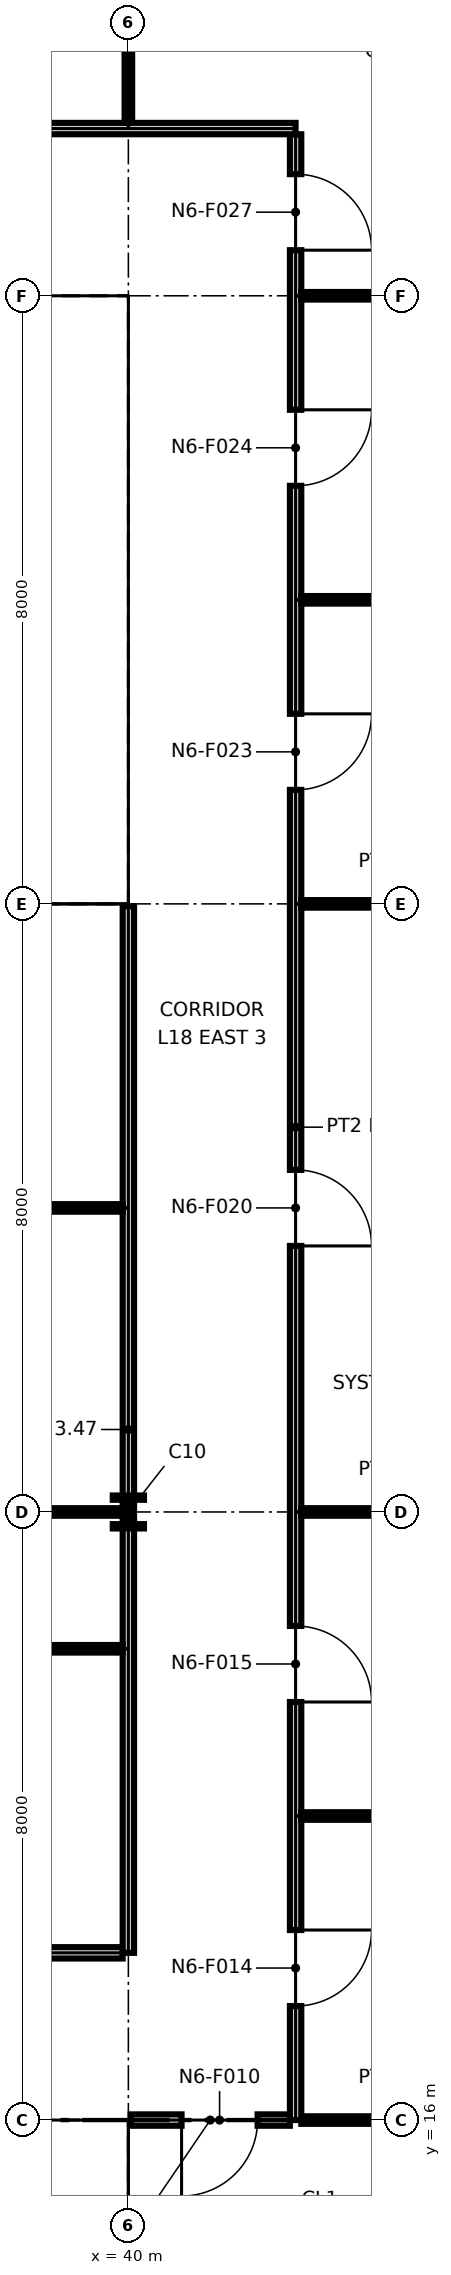
"""IFC4 building model, lengths in metres.
Left out: names, types, materials, properties, quantities, classifications, styles, units other than length and angle.
Written with IfcOpenShell. Run it as: python <this file> out.ifc"""

import sys

from ifc_helpers import new_model, si_unit, direction, frame, frame_2d, origin, origin_2d, place, context, subcontext, project, spatial, polyline, rectangle, i_section, outline, extrude, element, fill, save


model = new_model("IFC4")
c1 = context("Model", 3, precision=1e-05, world=origin(), true_north=direction((0.0, 1.0)))
c2 = subcontext(c1, "Body", "Model", "MODEL_VIEW")
j1 = project(units=[si_unit("LENGTHUNIT", "METRE"), si_unit("PLANEANGLEUNIT", "RADIAN")], contexts=[c1])
p1 = place(None, origin())
s1 = spatial("IfcSite", under=j1, at=p1, CompositionType="ELEMENT")
p2 = place(p1, origin())
s2 = spatial("IfcBuilding", under=s1, at=p2, CompositionType="ELEMENT")
p3 = place(p2, frame((0.0, 0.0, 96.4)))
s3 = spatial("IfcBuildingStorey", under=s2, at=p3, CompositionType="ELEMENT", Elevation=96.4)
p4 = place(p3, frame((40.0, 16.0, 0.0), z_axis=(0.0, 0.0, 1.0), x_axis=(1.0, 0.0, 0.0)))
e1 = element("IfcColumn", 1, at=p4, inside=s3, PredefinedType="COLUMN", context=c2, shape_type="SweptSolid", body=[
    extrude(i_section(OverallWidth=0.406, OverallDepth=0.417, WebThickness=0.03, FlangeThickness=0.048, at=origin_2d()), origin(), (0.0, 0.0, 1.0), 4.25),
])
p5 = place(p3, frame((40.0, 24.0, 0.0), z_axis=(0.0, 0.0, 1.0), x_axis=(1.0, 0.0, 0.0)))
e2 = element("IfcColumn", 2, at=p5, inside=s3, PredefinedType="COLUMN", context=c2, shape_type="SweptSolid", body=[
    extrude(i_section(OverallWidth=0.411, OverallDepth=0.434, WebThickness=0.036, FlangeThickness=0.057, at=origin_2d()), origin(), (0.0, 0.0, 1.0), 4.25),
])
for number, where, z_axis, x_axis in (
    (3, (40.0, 32.0, 0.0), (0.0, 0.0, 1.0), (1.0, 0.0, 0.0)),
    (4, (40.0, 40.0, 0.0), (0.0, 0.0, 1.0), (1.0, 0.0, 0.0)),
):
    element("IfcColumn", number, at=place(p3, frame(where, z_axis=z_axis, x_axis=x_axis)), inside=s3, PredefinedType="COLUMN", context=c2, shape_type="SweptSolid", body=[
        extrude(i_section(OverallWidth=0.257, OverallDepth=0.363, WebThickness=0.013, FlangeThickness=0.022, at=origin_2d()), origin(), (0.0, 0.0, 1.0), 4.25),
    ])
p6 = place(p3, frame((24.65, 15.25, 0.0), z_axis=(0.0, 0.0, 1.0), x_axis=(1.0, 0.0, 0.0)))
e5 = element("IfcWall", 5, at=p6, inside=s3, PredefinedType="PARTITIONING", context=c2, shape_type="SweptSolid", body=[
    extrude(outline(polyline([(0.0, 0.0), (14.7, 0.0), (14.7, 4.25), (7.469, 4.25), (7.469, 3.632), (7.231, 3.632), (7.23, 4.25), (0.0, 4.25), (0.0, 0.0)])), frame((0.0, 0.1, 0.0), z_axis=(0.0, -1.0, 0.0), x_axis=(1.0, 0.0, 0.0)), (0.0, 0.0, 1.0), 0.2),
])
p7 = place(p6, frame((2.85, 0.0, 0.0)))
e6 = element("IfcOpeningElement", 6, at=p7, cuts=e5, PredefinedType="OPENING", context=c2, shape_type="SweptSolid", body=[
    extrude(rectangle(XDim=1.8, YDim=2.1, at=frame_2d((0.9, 1.05))), frame((0.0, 0.11, 0.0), z_axis=(0.0, -1.0, 0.0), x_axis=(1.0, 0.0, 0.0)), (0.0, 0.0, 1.0), 0.22),
])
p8 = place(p6, frame((9.95, 0.0, 0.0), z_axis=(0.0, 0.0, 1.0), x_axis=(-1.0, 0.0, 0.0)))
e7 = element("IfcOpeningElement", 7, at=p8, cuts=e5, PredefinedType="OPENING", context=c2, shape_type="SweptSolid", body=[
    extrude(rectangle(XDim=1.4, YDim=2.1, at=frame_2d((0.7, 1.05))), frame((0.0, 0.11, 0.0), z_axis=(0.0, -1.0, 0.0), x_axis=(1.0, 0.0, 0.0)), (0.0, 0.0, 1.0), 0.22),
])
p9 = place(p6, frame((13.4, 0.0, 0.0), z_axis=(0.0, 0.0, 1.0), x_axis=(-1.0, 0.0, 0.0)))
e8 = element("IfcOpeningElement", 8, at=p9, cuts=e5, PredefinedType="OPENING", context=c2, shape_type="SweptSolid", body=[
    extrude(rectangle(XDim=1.4, YDim=2.1, at=frame_2d((0.7, 1.05))), frame((0.0, 0.11, 0.0), z_axis=(0.0, -1.0, 0.0), x_axis=(1.0, 0.0, 0.0)), (0.0, 0.0, 1.0), 0.22),
])
p10 = place(p3, frame((39.25, 8.85, 0.0), z_axis=(0.0, 0.0, 1.0), x_axis=(0.0, 1.0, 0.0)))
e9 = element("IfcWall", 9, at=p10, inside=s3, PredefinedType="PARTITIONING", context=c2, shape_type="SweptSolid", body=[
    extrude(rectangle(XDim=6.3, YDim=0.2, at=frame_2d((3.15, 0.0))), origin(), (0.0, 0.0, 1.0), 4.25),
])
p11 = place(p3, frame((24.65, 32.75, 0.0), z_axis=(0.0, 0.0, 1.0), x_axis=(1.0, 0.0, 0.0)))
e10 = element("IfcWall", 10, at=p11, inside=s3, PredefinedType="PARTITIONING", context=c2, shape_type="SweptSolid", body=[
    extrude(outline(polyline([(0.0, 0.0), (14.7, 0.0), (14.7, 4.25), (7.469, 4.25), (7.469, 3.632), (7.231, 3.632), (7.23, 4.25), (0.0, 4.25), (0.0, 0.0)])), frame((0.0, 0.1, 0.0), z_axis=(0.0, -1.0, 0.0), x_axis=(1.0, 0.0, 0.0)), (0.0, 0.0, 1.0), 0.2),
])
p12 = place(p11, frame((4.1, 0.0, 0.0)))
e11 = element("IfcOpeningElement", 11, at=p12, cuts=e10, PredefinedType="OPENING", context=c2, shape_type="SweptSolid", body=[
    extrude(rectangle(XDim=1.8, YDim=2.1, at=frame_2d((0.9, 1.05))), frame((0.0, 0.11, 0.0), z_axis=(0.0, -1.0, 0.0), x_axis=(1.0, 0.0, 0.0)), (0.0, 0.0, 1.0), 0.22),
])
p13 = place(p11, frame((8.55, 0.0, 0.0)))
e12 = element("IfcOpeningElement", 12, at=p13, cuts=e10, PredefinedType="OPENING", context=c2, shape_type="SweptSolid", body=[
    extrude(rectangle(XDim=1.4, YDim=2.1, at=frame_2d((0.7, 1.05))), frame((0.0, 0.11, 0.0), z_axis=(0.0, -1.0, 0.0), x_axis=(1.0, 0.0, 0.0)), (0.0, 0.0, 1.0), 0.22),
])
p14 = place(p11, frame((12.0, 0.0, 0.0)))
e13 = element("IfcOpeningElement", 13, at=p14, cuts=e10, PredefinedType="OPENING", context=c2, shape_type="SweptSolid", body=[
    extrude(rectangle(XDim=1.4, YDim=2.1, at=frame_2d((0.7, 1.05))), frame((0.0, 0.11, 0.0), z_axis=(0.0, -1.0, 0.0), x_axis=(1.0, 0.0, 0.0)), (0.0, 0.0, 1.0), 0.22),
])
p15 = place(p3, frame((24.65, 39.25, 0.0), z_axis=(0.0, 0.0, 1.0), x_axis=(1.0, 0.0, 0.0)))
e14 = element("IfcWall", 14, at=p15, inside=s3, PredefinedType="PARTITIONING", context=c2, shape_type="SweptSolid", body=[
    extrude(outline(polyline([(0.0, 0.0), (14.7, 0.0), (14.7, 4.25), (7.469, 4.25), (7.469, 3.632), (7.231, 3.632), (7.23, 4.25), (0.0, 4.25), (0.0, 0.0)])), frame((0.0, 0.1, 0.0), z_axis=(0.0, -1.0, 0.0), x_axis=(1.0, 0.0, 0.0)), (0.0, 0.0, 1.0), 0.2),
])
p16 = place(p3, frame((39.25, 32.85, 0.0), z_axis=(0.0, 0.0, 1.0), x_axis=(0.0, 1.0, 0.0)))
e15 = element("IfcWall", 15, at=p16, inside=s3, PredefinedType="PARTITIONING", context=c2, shape_type="SweptSolid", body=[
    extrude(rectangle(XDim=6.3, YDim=0.2, at=frame_2d((3.15, 0.0))), origin(), (0.0, 0.0, 1.0), 4.25),
])
p17 = place(p3, frame((40.03, 16.0, 0.0), z_axis=(0.0, 0.0, 1.0), x_axis=(1.0, 0.0, 0.0)))
e16 = element("IfcWall", 16, at=p17, inside=s3, PredefinedType="PARTITIONING", context=c2, shape_type="SweptSolid", body=[
    extrude(rectangle(XDim=2.095, YDim=0.15, at=frame_2d((1.047, 0.0))), origin(), (0.0, 0.0, 1.0), 3.47),
])
p18 = place(p17, frame((1.67, 0.0, 0.0), z_axis=(0.0, 0.0, 1.0), x_axis=(-1.0, 0.0, 0.0)))
e17 = element("IfcOpeningElement", 17, at=p18, cuts=e16, PredefinedType="OPENING", context=c2, shape_type="SweptSolid", body=[
    extrude(rectangle(XDim=1.0, YDim=2.1, at=frame_2d((0.5, 1.05))), frame((0.0, 0.085, 0.0), z_axis=(0.0, -1.0, 0.0), x_axis=(1.0, 0.0, 0.0)), (0.0, 0.0, 1.0), 0.17),
])
p19 = place(p3, frame((42.275, 16.0, 0.0), z_axis=(0.0, 0.0, 1.0), x_axis=(1.0, 0.0, 0.0)))
e18 = element("IfcWall", 18, at=p19, inside=s3, PredefinedType="PARTITIONING", context=c2, shape_type="SweptSolid", body=[
    extrude(rectangle(XDim=2.895, YDim=0.1, at=frame_2d((1.448, 0.0))), origin(), (0.0, 0.0, 1.0), 3.47),
])
p20 = place(p3, frame((42.2, 16.0, 0.0), z_axis=(0.0, 0.0, 1.0), x_axis=(0.0, 1.0, 0.0)))
e19 = element("IfcWall", 19, at=p20, inside=s3, PredefinedType="PARTITIONING", context=c2, shape_type="SweptSolid", body=[
    extrude(outline(polyline([(0.0, 0.0), (26.125, 0.0), (26.125, 4.25), (24.3, 4.25), (24.298, 3.47), (23.702, 3.47), (23.7, 4.25), (20.3, 4.25), (20.298, 3.47), (19.702, 3.47), (19.7, 4.25), (16.3, 4.25), (16.298, 3.47), (15.702, 3.47), (15.7, 4.25), (12.3, 4.25), (12.298, 3.47), (11.702, 3.47), (11.7, 4.25), (8.3, 4.25), (8.298, 3.47), (7.702, 3.47), (7.7, 4.25), (4.3, 4.25), (4.298, 3.47), (3.702, 3.47), (3.7, 4.25), (0.0, 4.25), (0.0, 0.0)])), frame((0.0, 0.075, 0.0), z_axis=(0.0, -1.0, 0.0), x_axis=(1.0, 0.0, 0.0)), (0.0, 0.0, 1.0), 0.15),
])
p21 = place(p20, frame((2.5, 0.0, 0.0), z_axis=(0.0, 0.0, 1.0), x_axis=(-1.0, 0.0, 0.0)))
e20 = element("IfcOpeningElement", 20, at=p21, cuts=e19, PredefinedType="OPENING", context=c2, shape_type="SweptSolid", body=[
    extrude(rectangle(XDim=1.0, YDim=2.1, at=frame_2d((0.5, 1.05))), frame((0.0, 0.085, 0.0), z_axis=(0.0, -1.0, 0.0), x_axis=(1.0, 0.0, 0.0)), (0.0, 0.0, 1.0), 0.17),
])
p22 = place(p20, frame((6.5, 0.0, 0.0), z_axis=(0.0, 0.0, 1.0), x_axis=(-1.0, 0.0, 0.0)))
e21 = element("IfcOpeningElement", 21, at=p22, cuts=e19, PredefinedType="OPENING", context=c2, shape_type="SweptSolid", body=[
    extrude(rectangle(XDim=1.0, YDim=2.1, at=frame_2d((0.5, 1.05))), frame((0.0, 0.085, 0.0), z_axis=(0.0, -1.0, 0.0), x_axis=(1.0, 0.0, 0.0)), (0.0, 0.0, 1.0), 0.17),
])
p23 = place(p20, frame((12.5, 0.0, 0.0), z_axis=(0.0, 0.0, 1.0), x_axis=(-1.0, 0.0, 0.0)))
e22 = element("IfcOpeningElement", 22, at=p23, cuts=e19, PredefinedType="OPENING", context=c2, shape_type="SweptSolid", body=[
    extrude(rectangle(XDim=1.0, YDim=2.1, at=frame_2d((0.5, 1.05))), frame((0.0, 0.085, 0.0), z_axis=(0.0, -1.0, 0.0), x_axis=(1.0, 0.0, 0.0)), (0.0, 0.0, 1.0), 0.17),
])
p24 = place(p20, frame((18.5, 0.0, 0.0), z_axis=(0.0, 0.0, 1.0), x_axis=(-1.0, 0.0, 0.0)))
e23 = element("IfcOpeningElement", 23, at=p24, cuts=e19, PredefinedType="OPENING", context=c2, shape_type="SweptSolid", body=[
    extrude(rectangle(XDim=1.0, YDim=2.1, at=frame_2d((0.5, 1.05))), frame((0.0, 0.085, 0.0), z_axis=(0.0, -1.0, 0.0), x_axis=(1.0, 0.0, 0.0)), (0.0, 0.0, 1.0), 0.17),
])
p25 = place(p20, frame((22.5, 0.0, 0.0), z_axis=(0.0, 0.0, 1.0), x_axis=(-1.0, 0.0, 0.0)))
e24 = element("IfcOpeningElement", 24, at=p25, cuts=e19, PredefinedType="OPENING", context=c2, shape_type="SweptSolid", body=[
    extrude(rectangle(XDim=1.0, YDim=2.1, at=frame_2d((0.5, 1.05))), frame((0.0, 0.085, 0.0), z_axis=(0.0, -1.0, 0.0), x_axis=(1.0, 0.0, 0.0)), (0.0, 0.0, 1.0), 0.17),
])
p26 = place(p20, frame((25.6, 0.0, 0.0), z_axis=(0.0, 0.0, 1.0), x_axis=(-1.0, 0.0, 0.0)))
e25 = element("IfcOpeningElement", 25, at=p26, cuts=e19, PredefinedType="OPENING", context=c2, shape_type="SweptSolid", body=[
    extrude(rectangle(XDim=1.0, YDim=2.1, at=frame_2d((0.5, 1.05))), frame((0.0, 0.085, 0.0), z_axis=(0.0, -1.0, 0.0), x_axis=(1.0, 0.0, 0.0)), (0.0, 0.0, 1.0), 0.17),
])
p27 = place(p3, frame((27.075, 18.2, 0.0), z_axis=(0.0, 0.0, 1.0), x_axis=(1.0, 0.0, 0.0)))
e26 = element("IfcWall", 26, at=p27, inside=s3, PredefinedType="PARTITIONING", context=c2, shape_type="SweptSolid", body=[
    extrude(rectangle(XDim=12.85, YDim=0.15, at=frame_2d((6.425, 0.0))), origin(), (0.0, 0.0, 1.0), 4.25),
])
p28 = place(p27, frame((1.925, 0.0, 0.0)))
e27 = element("IfcOpeningElement", 27, at=p28, cuts=e26, PredefinedType="OPENING", context=c2, shape_type="SweptSolid", body=[
    extrude(rectangle(XDim=1.0, YDim=2.1, at=frame_2d((0.5, 1.05))), frame((0.0, 0.085, 0.0), z_axis=(0.0, -1.0, 0.0), x_axis=(1.0, 0.0, 0.0)), (0.0, 0.0, 1.0), 0.17),
])
p29 = place(p3, frame((40.0, 18.2, 0.0), z_axis=(0.0, 0.0, 1.0), x_axis=(0.0, 1.0, 0.0)))
e28 = element("IfcWall", 28, at=p29, inside=s3, PredefinedType="PARTITIONING", context=c2, shape_type="SweptSolid", body=[
    extrude(rectangle(XDim=13.77, YDim=0.15, at=frame_2d((6.885, 0.0))), origin(), (0.0, 0.0, 1.0), 3.47),
])
p30 = place(p3, frame((42.275, 20.0, 0.0), z_axis=(0.0, 0.0, 1.0), x_axis=(1.0, 0.0, 0.0)))
e29 = element("IfcWall", 29, at=p30, inside=s3, PredefinedType="PARTITIONING", context=c2, shape_type="SweptSolid", body=[
    extrude(rectangle(XDim=5.595, YDim=0.1, at=frame_2d((2.798, 0.0))), origin(), (0.0, 0.0, 1.0), 3.47),
])
p31 = place(p3, frame((27.075, 22.2, 0.0), z_axis=(0.0, 0.0, 1.0), x_axis=(1.0, 0.0, 0.0)))
e30 = element("IfcWall", 30, at=p31, inside=s3, PredefinedType="PARTITIONING", context=c2, shape_type="SweptSolid", body=[
    extrude(rectangle(XDim=12.85, YDim=0.1, at=frame_2d((6.425, 0.0))), origin(), (0.0, 0.0, 1.0), 4.25),
])
p32 = place(p31, frame((6.925, 0.0, 0.0), z_axis=(0.0, 0.0, 1.0), x_axis=(-1.0, 0.0, 0.0)))
e31 = element("IfcOpeningElement", 31, at=p32, cuts=e30, PredefinedType="OPENING", context=c2, shape_type="SweptSolid", body=[
    extrude(rectangle(XDim=1.0, YDim=2.1, at=frame_2d((0.5, 1.05))), frame((0.0, 0.06, 0.0), z_axis=(0.0, -1.0, 0.0), x_axis=(1.0, 0.0, 0.0)), (0.0, 0.0, 1.0), 0.12),
])
p33 = place(p3, frame((27.075, 24.0, 0.0), z_axis=(0.0, 0.0, 1.0), x_axis=(1.0, 0.0, 0.0)))
e32 = element("IfcWall", 32, at=p33, inside=s3, PredefinedType="PARTITIONING", context=c2, shape_type="SweptSolid", body=[
    extrude(rectangle(XDim=12.85, YDim=0.1, at=frame_2d((6.425, 0.0))), origin(), (0.0, 0.0, 1.0), 3.47),
])
p34 = place(p3, frame((42.275, 24.0, 0.0), z_axis=(0.0, 0.0, 1.0), x_axis=(1.0, 0.0, 0.0)))
e33 = element("IfcWall", 33, at=p34, inside=s3, PredefinedType="PARTITIONING", context=c2, shape_type="SweptSolid", body=[
    extrude(rectangle(XDim=2.895, YDim=0.1, at=frame_2d((1.448, 0.0))), origin(), (0.0, 0.0, 1.0), 3.47),
])
p35 = place(p3, frame((27.075, 28.0, 0.0), z_axis=(0.0, 0.0, 1.0), x_axis=(1.0, 0.0, 0.0)))
e34 = element("IfcWall", 34, at=p35, inside=s3, PredefinedType="PARTITIONING", context=c2, shape_type="SweptSolid", body=[
    extrude(rectangle(XDim=12.85, YDim=0.1, at=frame_2d((6.425, 0.0))), origin(), (0.0, 0.0, 1.0), 3.47),
])
p36 = place(p3, frame((42.275, 32.0, 0.0), z_axis=(0.0, 0.0, 1.0), x_axis=(1.0, 0.0, 0.0)))
e35 = element("IfcWall", 35, at=p36, inside=s3, PredefinedType="PARTITIONING", context=c2, shape_type="SweptSolid", body=[
    extrude(rectangle(XDim=2.895, YDim=0.1, at=frame_2d((1.448, 0.0))), origin(), (0.0, 0.0, 1.0), 3.47),
])
for number, where, z_axis, x_axis in (
    (36, (42.275, 36.0, 0.0), (0.0, 0.0, 1.0), (1.0, 0.0, 0.0)),
    (37, (42.275, 40.0, 0.0), (0.0, 0.0, 1.0), (1.0, 0.0, 0.0)),
):
    element("IfcWall", number, at=place(p3, frame(where, z_axis=z_axis, x_axis=x_axis)), inside=s3, PredefinedType="PARTITIONING", context=c2, shape_type="SweptSolid", body=[
        extrude(rectangle(XDim=5.595, YDim=0.1, at=frame_2d((2.798, 0.0))), origin(), (0.0, 0.0, 1.0), 3.47),
    ])
p37 = place(p3, frame((8.05, 42.2, 0.0), z_axis=(0.0, 0.0, 1.0), x_axis=(1.0, 0.0, 0.0)))
e38 = element("IfcWall", 38, at=p37, inside=s3, PredefinedType="PARTITIONING", context=c2, shape_type="SweptSolid", body=[
    extrude(rectangle(XDim=34.15, YDim=0.15, at=frame_2d((17.075, 0.0))), origin(), (0.0, 0.0, 1.0), 4.25),
])
p38 = place(p37, frame((11.45, 0.0, 0.0)))
e39 = element("IfcOpeningElement", 39, at=p38, cuts=e38, PredefinedType="OPENING", context=c2, shape_type="SweptSolid", body=[
    extrude(rectangle(XDim=1.0, YDim=2.1, at=frame_2d((0.5, 1.05))), frame((0.0, 0.085, 0.0), z_axis=(0.0, -1.0, 0.0), x_axis=(1.0, 0.0, 0.0)), (0.0, 0.0, 1.0), 0.17),
])
p39 = place(p37, frame((27.45, 0.0, 0.0)))
e40 = element("IfcOpeningElement", 40, at=p39, cuts=e38, PredefinedType="OPENING", context=c2, shape_type="SweptSolid", body=[
    extrude(rectangle(XDim=1.0, YDim=2.1, at=frame_2d((0.5, 1.05))), frame((0.0, 0.085, 0.0), z_axis=(0.0, -1.0, 0.0), x_axis=(1.0, 0.0, 0.0)), (0.0, 0.0, 1.0), 0.17),
])
p40 = place(p37, frame((1.45, 0.0, 0.0)))
e41 = element("IfcOpeningElement", 41, at=p40, cuts=e38, PredefinedType="OPENING", context=c2, shape_type="SweptSolid", body=[
    extrude(rectangle(XDim=1.0, YDim=2.1, at=frame_2d((0.5, 1.05))), frame((0.0, 0.085, 0.0), z_axis=(0.0, -1.0, 0.0), x_axis=(1.0, 0.0, 0.0)), (0.0, 0.0, 1.0), 0.17),
])
p41 = place(p37, frame((5.45, 0.0, 0.0)))
e42 = element("IfcOpeningElement", 42, at=p41, cuts=e38, PredefinedType="OPENING", context=c2, shape_type="SweptSolid", body=[
    extrude(rectangle(XDim=1.0, YDim=2.1, at=frame_2d((0.5, 1.05))), frame((0.0, 0.085, 0.0), z_axis=(0.0, -1.0, 0.0), x_axis=(1.0, 0.0, 0.0)), (0.0, 0.0, 1.0), 0.17),
])
p42 = place(p37, frame((17.45, 0.0, 0.0)))
e43 = element("IfcOpeningElement", 43, at=p42, cuts=e38, PredefinedType="OPENING", context=c2, shape_type="SweptSolid", body=[
    extrude(rectangle(XDim=1.0, YDim=2.1, at=frame_2d((0.5, 1.05))), frame((0.0, 0.085, 0.0), z_axis=(0.0, -1.0, 0.0), x_axis=(1.0, 0.0, 0.0)), (0.0, 0.0, 1.0), 0.17),
])
p43 = place(p37, frame((21.45, 0.0, 0.0)))
e44 = element("IfcOpeningElement", 44, at=p43, cuts=e38, PredefinedType="OPENING", context=c2, shape_type="SweptSolid", body=[
    extrude(rectangle(XDim=1.0, YDim=2.1, at=frame_2d((0.5, 1.05))), frame((0.0, 0.085, 0.0), z_axis=(0.0, -1.0, 0.0), x_axis=(1.0, 0.0, 0.0)), (0.0, 0.0, 1.0), 0.17),
])
p44 = place(p3, frame((40.0, 42.275, 0.0), z_axis=(0.0, 0.0, 1.0), x_axis=(0.0, 1.0, 0.0)))
e45 = element("IfcWall", 45, at=p44, inside=s3, PredefinedType="PARTITIONING", context=c2, shape_type="SweptSolid", body=[
    extrude(rectangle(XDim=2.895, YDim=0.1, at=frame_2d((1.448, 0.0))), origin(), (0.0, 0.0, 1.0), 3.47),
])
p45 = place(p18, origin())
e46 = element("IfcDoor", 46, at=p45, inside=s3, OperationType="SINGLE_SWING_RIGHT", PredefinedType="DOOR", context=c2, shape_type="SweptSolid", body=[
    extrude(rectangle(XDim=1.0, YDim=2.1, at=frame_2d((0.5, 1.05))), frame((0.0, 0.025, 0.0), z_axis=(0.0, -1.0, 0.0), x_axis=(1.0, 0.0, 0.0)), (0.0, 0.0, 1.0), 0.05),
])
fill(e17, e46)
p46 = place(p21, origin())
e47 = element("IfcDoor", 47, at=p46, inside=s3, OperationType="SINGLE_SWING_LEFT", PredefinedType="DOOR", context=c2, shape_type="SweptSolid", body=[
    extrude(rectangle(XDim=1.0, YDim=2.1, at=frame_2d((0.5, 1.05))), frame((0.0, 0.025, 0.0), z_axis=(0.0, -1.0, 0.0), x_axis=(1.0, 0.0, 0.0)), (0.0, 0.0, 1.0), 0.05),
])
fill(e20, e47)
p47 = place(p22, origin())
e48 = element("IfcDoor", 48, at=p47, inside=s3, OperationType="SINGLE_SWING_RIGHT", PredefinedType="DOOR", context=c2, shape_type="SweptSolid", body=[
    extrude(rectangle(XDim=1.0, YDim=2.1, at=frame_2d((0.5, 1.05))), frame((0.0, 0.025, 0.0), z_axis=(0.0, -1.0, 0.0), x_axis=(1.0, 0.0, 0.0)), (0.0, 0.0, 1.0), 0.05),
])
fill(e21, e48)
p48 = place(p23, origin())
e49 = element("IfcDoor", 49, at=p48, inside=s3, OperationType="SINGLE_SWING_RIGHT", PredefinedType="DOOR", context=c2, shape_type="SweptSolid", body=[
    extrude(rectangle(XDim=1.0, YDim=2.1, at=frame_2d((0.5, 1.05))), frame((0.0, 0.025, 0.0), z_axis=(0.0, -1.0, 0.0), x_axis=(1.0, 0.0, 0.0)), (0.0, 0.0, 1.0), 0.05),
])
fill(e22, e49)
p49 = place(p24, origin())
e50 = element("IfcDoor", 50, at=p49, inside=s3, OperationType="SINGLE_SWING_LEFT", PredefinedType="DOOR", context=c2, shape_type="SweptSolid", body=[
    extrude(rectangle(XDim=1.0, YDim=2.1, at=frame_2d((0.5, 1.05))), frame((0.0, 0.025, 0.0), z_axis=(0.0, -1.0, 0.0), x_axis=(1.0, 0.0, 0.0)), (0.0, 0.0, 1.0), 0.05),
])
fill(e23, e50)
p50 = place(p25, origin())
e51 = element("IfcDoor", 51, at=p50, inside=s3, OperationType="SINGLE_SWING_LEFT", PredefinedType="DOOR", context=c2, shape_type="SweptSolid", body=[
    extrude(rectangle(XDim=1.0, YDim=2.1, at=frame_2d((0.5, 1.05))), frame((0.0, 0.025, 0.0), z_axis=(0.0, -1.0, 0.0), x_axis=(1.0, 0.0, 0.0)), (0.0, 0.0, 1.0), 0.05),
])
fill(e24, e51)
p51 = place(p26, origin())
e52 = element("IfcDoor", 52, at=p51, inside=s3, OperationType="SINGLE_SWING_RIGHT", PredefinedType="DOOR", context=c2, shape_type="SweptSolid", body=[
    extrude(rectangle(XDim=1.0, YDim=2.1, at=frame_2d((0.5, 1.05))), frame((0.0, 0.025, 0.0), z_axis=(0.0, -1.0, 0.0), x_axis=(1.0, 0.0, 0.0)), (0.0, 0.0, 1.0), 0.05),
])
fill(e25, e52)
save(model, sys.argv[1])
